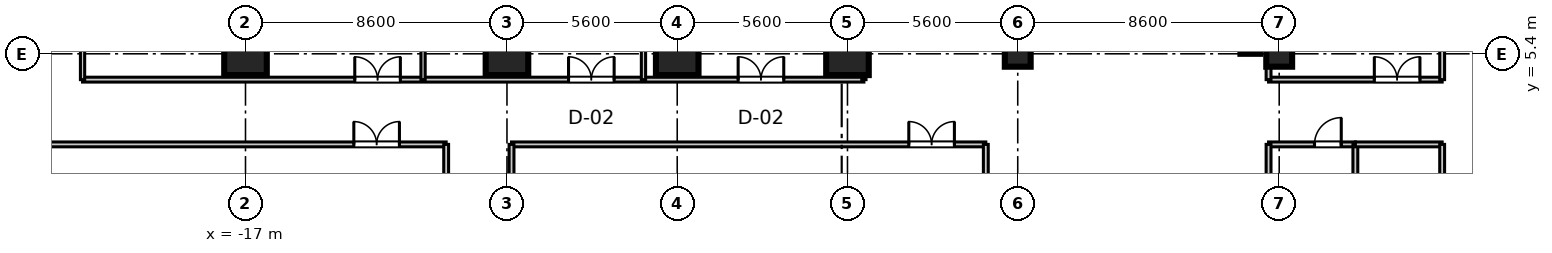
"""IFC4 building model, lengths in metres.
Left out: names, types, materials, properties, quantities, classifications, styles, units other than length and angle.
Written with IfcOpenShell. Run it as: python <this file> out.ifc"""

import sys

from ifc_helpers import new_model, si_unit, direction, frame, frame_2d, origin, origin_2d, place, context, subcontext, project, spatial, rectangle, extrude, source, transform, mapped, element, fill, save


model = new_model("IFC4")
c1 = context("Model", 3, precision=1e-05, world=origin(), true_north=direction((0.0, 1.0)))
c2 = subcontext(c1, "Body", "Model", "MODEL_VIEW")
j1 = project(units=[si_unit("LENGTHUNIT", "METRE"), si_unit("PLANEANGLEUNIT", "RADIAN")], contexts=[c1])
p1 = place(None, origin())
s1 = spatial("IfcSite", under=j1, at=p1, CompositionType="ELEMENT")
p2 = place(p1, origin())
s2 = spatial("IfcBuilding", under=s1, at=p2, CompositionType="ELEMENT")
p3 = place(p2, frame((0.0, 0.0, 76.2)))
s3 = spatial("IfcBuildingStorey", under=s2, at=p3, CompositionType="ELEMENT", Elevation=76.2)
m1 = source(origin(), c2, "Body", "SweptSolid", [
    extrude(rectangle(XDim=1.4, YDim=1.4, at=origin_2d()), origin(), (0.0, 0.0, 1.0), 3.605),
])
for number, where, z_axis, x_axis in (
    (1, (-17.0, 5.4, 0.0), (0.0, 0.0, 1.0), (1.0, 0.0, 0.0)),
    (2, (-8.4, 5.4, 0.0), (0.0, 0.0, 1.0), (1.0, 0.0, 0.0)),
    (3, (-2.8, 5.4, 0.0), (0.0, 0.0, 1.0), (1.0, 0.0, 0.0)),
    (4, (2.8, 5.4, 0.0), (0.0, 0.0, 1.0), (1.0, 0.0, 0.0)),
):
    element("IfcColumn", number, at=place(p3, frame(where, z_axis=z_axis, x_axis=x_axis)), inside=s3, PredefinedType="COLUMN", context=c2, shape_type="MappedRepresentation", body=[
        mapped(m1, transform((0.0, 0.0, 0.0), scale=1.0)),
    ])
m2 = source(origin(), c2, "Body", "SweptSolid", [
    extrude(rectangle(XDim=0.85, YDim=0.85, at=origin_2d()), origin(), (0.0, 0.0, 1.0), 3.605),
])
for number, where, z_axis, x_axis in (
    (5, (8.4, 5.4, 0.0), (0.0, 0.0, 1.0), (1.0, 0.0, 0.0)),
    (6, (17.0, 5.4, 0.0), (0.0, 0.0, 1.0), (1.0, 0.0, 0.0)),
):
    element("IfcColumn", number, at=place(p3, frame(where, z_axis=z_axis, x_axis=x_axis)), inside=s3, PredefinedType="PILASTER", context=c2, shape_type="MappedRepresentation", body=[
        mapped(m2, transform((0.0, 0.0, 0.0), scale=1.0)),
    ])
m3 = source(origin(), c2, "Body", "SweptSolid", [
    extrude(rectangle(XDim=11.6, YDim=0.65, at=frame_2d((5.8, 0.0))), origin(), (0.0, 0.0, 1.0), 3.37),
])
p4 = place(p3, frame((16.05, 5.4, 0.0), z_axis=(0.0, 0.0, 1.0), x_axis=(0.0, 1.0, 0.0)))
e7 = element("IfcWall", 7, at=p4, inside=s3, PredefinedType="SHEAR", context=c2, shape_type="MappedRepresentation", body=[
    mapped(m3, transform((0.0, 0.0, 0.0), scale=1.0)),
])
m4 = source(origin(), c2, "Body", "SweptSolid", [
    extrude(rectangle(XDim=5.71, YDim=0.16, at=frame_2d((2.855, 0.0))), origin(), (0.0, 0.0, 1.0), 2.71),
])
p5 = place(p3, frame((16.65, 4.55, 0.0), z_axis=(0.0, 0.0, 1.0), x_axis=(1.0, 0.0, 0.0)))
e8 = element("IfcWall", 8, at=p5, inside=s3, PredefinedType="PARTITIONING", context=c2, shape_type="MappedRepresentation", body=[
    mapped(m4, transform((0.0, 0.0, 0.0), scale=1.0)),
])
p6 = place(p5, frame((3.479, 0.0, 0.0)))
e9 = element("IfcOpeningElement", 9, at=p6, cuts=e8, PredefinedType="OPENING", context=c2, shape_type="SweptSolid", body=[
    extrude(rectangle(XDim=1.5, YDim=2.15, at=frame_2d((0.75, 1.075))), frame((0.0, 0.09, 0.0), z_axis=(0.0, -1.0, 0.0), x_axis=(1.0, 0.0, 0.0)), (0.0, 0.0, 1.0), 0.18),
])
m5 = source(origin(), c2, "Body", "SweptSolid", [
    extrude(rectangle(XDim=20.55, YDim=0.16, at=frame_2d((10.275, 0.0))), origin(), (0.0, 0.0, 1.0), 2.71),
])
p7 = place(p3, frame((16.65, 4.55, 0.0), z_axis=(0.0, 0.0, 1.0), x_axis=(0.0, 1.0, 0.0)))
e10 = element("IfcWall", 10, at=p7, inside=s3, PredefinedType="PARTITIONING", context=c2, shape_type="MappedRepresentation", body=[
    mapped(m5, transform((0.0, 0.0, 0.0), scale=1.0)),
])
m6 = source(origin(), c2, "Body", "SweptSolid", [
    extrude(rectangle(XDim=19.13, YDim=0.16, at=frame_2d((9.565, 0.0))), origin(), (0.0, 0.0, 1.0), 2.71),
])
p8 = place(p3, frame((22.36, 4.55, 0.0), z_axis=(0.0, 0.0, 1.0), x_axis=(0.0, 1.0, 0.0)))
e11 = element("IfcWall", 11, at=p8, inside=s3, PredefinedType="PARTITIONING", context=c2, shape_type="MappedRepresentation", body=[
    mapped(m6, transform((0.0, 0.0, 0.0), scale=1.0)),
])
m7 = source(origin(), c2, "Body", "SweptSolid", [
    extrude(rectangle(XDim=25.7, YDim=0.16, at=frame_2d((12.85, 0.0))), origin(), (0.0, 0.0, 1.0), 2.71),
])
p9 = place(p3, frame((-22.36, 4.55, 0.0), z_axis=(0.0, 0.0, 1.0), x_axis=(1.0, 0.0, 0.0)))
e12 = element("IfcWall", 12, at=p9, inside=s3, PredefinedType="PARTITIONING", context=c2, shape_type="MappedRepresentation", body=[
    mapped(m7, transform((0.0, 0.0, 0.0), scale=1.0)),
])
p10 = place(p9, frame((8.954, 0.0, 0.0)))
e13 = element("IfcOpeningElement", 13, at=p10, cuts=e12, PredefinedType="OPENING", context=c2, shape_type="SweptSolid", body=[
    extrude(rectangle(XDim=1.5, YDim=2.15, at=frame_2d((0.75, 1.075))), frame((0.0, 0.09, 0.0), z_axis=(0.0, -1.0, 0.0), x_axis=(1.0, 0.0, 0.0)), (0.0, 0.0, 1.0), 0.18),
])
p11 = place(p9, frame((15.985, 0.0, 0.0)))
e14 = element("IfcOpeningElement", 14, at=p11, cuts=e12, PredefinedType="OPENING", context=c2, shape_type="SweptSolid", body=[
    extrude(rectangle(XDim=1.5, YDim=2.15, at=frame_2d((0.75, 1.075))), frame((0.0, 0.09, 0.0), z_axis=(0.0, -1.0, 0.0), x_axis=(1.0, 0.0, 0.0)), (0.0, 0.0, 1.0), 0.18),
])
p12 = place(p9, frame((21.564, 0.0, 0.0)))
e15 = element("IfcOpeningElement", 15, at=p12, cuts=e12, PredefinedType="OPENING", context=c2, shape_type="SweptSolid", body=[
    extrude(rectangle(XDim=1.5, YDim=2.15, at=frame_2d((0.75, 1.075))), frame((0.0, 0.09, 0.0), z_axis=(0.0, -1.0, 0.0), x_axis=(1.0, 0.0, 0.0)), (0.0, 0.0, 1.0), 0.18),
])
m8 = source(origin(), c2, "Body", "SweptSolid", [
    extrude(rectangle(XDim=19.13, YDim=0.14, at=frame_2d((9.565, 0.0))), origin(), (0.0, 0.0, 1.0), 2.71),
])
p13 = place(p3, frame((-22.36, 4.55, 0.0), z_axis=(0.0, 0.0, 1.0), x_axis=(0.0, 1.0, 0.0)))
e16 = element("IfcWall", 16, at=p13, inside=s3, PredefinedType="PARTITIONING", context=c2, shape_type="MappedRepresentation", body=[
    mapped(m8, transform((0.0, 0.0, 0.0), scale=1.0)),
])
m9 = source(origin(), c2, "Body", "SweptSolid", [
    extrude(rectangle(XDim=20.55, YDim=0.14, at=frame_2d((10.275, 0.0))), origin(), (0.0, 0.0, 1.0), 2.71),
])
for number, where, z_axis, x_axis in (
    (17, (3.34, 4.55, 0.0), (0.0, 0.0, 1.0), (0.0, 1.0, 0.0)),
    (18, (-11.16, 4.55, 0.0), (0.0, 0.0, 1.0), (0.0, 1.0, 0.0)),
    (19, (-3.91, 4.55, 0.0), (0.0, 0.0, 1.0), (0.0, 1.0, 0.0)),
):
    element("IfcWall", number, at=place(p3, frame(where, z_axis=z_axis, x_axis=x_axis)), inside=s3, PredefinedType="PARTITIONING", context=c2, shape_type="MappedRepresentation", body=[
        mapped(m9, transform((0.0, 0.0, 0.0), scale=1.0)),
    ])
m10 = source(origin(), c2, "Body", "SweptSolid", [
    extrude(rectangle(XDim=14.7, YDim=0.16, at=frame_2d((7.35, 0.0))), origin(), (0.0, 0.0, 1.0), 2.71),
])
p14 = place(p3, frame((-25.1, 2.42, 0.0), z_axis=(0.0, 0.0, 1.0), x_axis=(1.0, 0.0, 0.0)))
e20 = element("IfcWall", 20, at=p14, inside=s3, PredefinedType="PARTITIONING", context=c2, shape_type="MappedRepresentation", body=[
    mapped(m10, transform((0.0, 0.0, 0.0), scale=1.0)),
])
p15 = place(p14, frame((11.663, 0.0, 0.0)))
e21 = element("IfcOpeningElement", 21, at=p15, cuts=e20, PredefinedType="OPENING", context=c2, shape_type="SweptSolid", body=[
    extrude(rectangle(XDim=1.5, YDim=2.15, at=frame_2d((0.75, 1.075))), frame((0.0, 0.09, 0.0), z_axis=(0.0, -1.0, 0.0), x_axis=(1.0, 0.0, 0.0)), (0.0, 0.0, 1.0), 0.18),
])
m11 = source(origin(), c2, "Body", "SweptSolid", [
    extrude(rectangle(XDim=4.84, YDim=0.16, at=frame_2d((2.42, 0.0))), origin(), (0.0, 0.0, 1.0), 2.71),
])
p16 = place(p3, frame((-10.4, -2.42, 0.0), z_axis=(0.0, 0.0, 1.0), x_axis=(0.0, 1.0, 0.0)))
e22 = element("IfcWall", 22, at=p16, inside=s3, PredefinedType="PARTITIONING", context=c2, shape_type="MappedRepresentation", body=[
    mapped(m11, transform((0.0, 0.0, 0.0), scale=1.0)),
])
m12 = source(origin(), c2, "Body", "SweptSolid", [
    extrude(rectangle(XDim=15.6, YDim=0.16, at=frame_2d((7.8, 0.0))), origin(), (0.0, 0.0, 1.0), 2.71),
])
p17 = place(p3, frame((-8.25, 2.42, 0.0), z_axis=(0.0, 0.0, 1.0), x_axis=(1.0, 0.0, 0.0)))
e23 = element("IfcWall", 23, at=p17, inside=s3, PredefinedType="PARTITIONING", context=c2, shape_type="MappedRepresentation", body=[
    mapped(m12, transform((0.0, 0.0, 0.0), scale=1.0)),
])
p18 = place(p17, frame((13.067, 0.0, 0.0)))
e24 = element("IfcOpeningElement", 24, at=p18, cuts=e23, PredefinedType="OPENING", context=c2, shape_type="SweptSolid", body=[
    extrude(rectangle(XDim=1.5, YDim=2.15, at=frame_2d((0.75, 1.075))), frame((0.0, 0.09, 0.0), z_axis=(0.0, -1.0, 0.0), x_axis=(1.0, 0.0, 0.0)), (0.0, 0.0, 1.0), 0.18),
])
for number, where, z_axis, x_axis in (
    (25, (-8.25, -2.42, 0.0), (0.0, 0.0, 1.0), (0.0, 1.0, 0.0)),
    (26, (7.35, -2.42, 0.0), (0.0, 0.0, 1.0), (0.0, 1.0, 0.0)),
):
    element("IfcWall", number, at=place(p3, frame(where, z_axis=z_axis, x_axis=x_axis)), inside=s3, PredefinedType="PARTITIONING", context=c2, shape_type="MappedRepresentation", body=[
        mapped(m11, transform((0.0, 0.0, 0.0), scale=1.0)),
    ])
m13 = source(origin(), c2, "Body", "SweptSolid", [
    extrude(rectangle(XDim=2.855, YDim=0.16, at=frame_2d((1.427, 0.0))), origin(), (0.0, 0.0, 1.0), 2.71),
])
p19 = place(p3, frame((16.65, 2.42, 0.0), z_axis=(0.0, 0.0, 1.0), x_axis=(1.0, 0.0, 0.0)))
e27 = element("IfcWall", 27, at=p19, inside=s3, PredefinedType="PARTITIONING", context=c2, shape_type="MappedRepresentation", body=[
    mapped(m13, transform((0.0, 0.0, 0.0), scale=1.0)),
])
p20 = place(p19, frame((1.511, 0.0, 0.0)))
e28 = element("IfcOpeningElement", 28, at=p20, cuts=e27, PredefinedType="OPENING", context=c2, shape_type="SweptSolid", body=[
    extrude(rectangle(XDim=0.88, YDim=2.1, at=frame_2d((0.44, 1.05))), frame((0.0, 0.09, 0.0), z_axis=(0.0, -1.0, 0.0), x_axis=(1.0, 0.0, 0.0)), (0.0, 0.0, 1.0), 0.18),
])
for number, where, z_axis, x_axis in (
    (29, (16.65, -2.42, 0.0), (0.0, 0.0, 1.0), (0.0, 1.0, 0.0)),
    (30, (19.505, -2.42, 0.0), (0.0, 0.0, 1.0), (0.0, 1.0, 0.0)),
):
    element("IfcWall", number, at=place(p3, frame(where, z_axis=z_axis, x_axis=x_axis)), inside=s3, PredefinedType="PARTITIONING", context=c2, shape_type="MappedRepresentation", body=[
        mapped(m11, transform((0.0, 0.0, 0.0), scale=1.0)),
    ])
m14 = source(origin(), c2, "Body", "SweptSolid", [
    extrude(rectangle(XDim=2.855, YDim=0.16, at=frame_2d((1.428, 0.0))), origin(), (0.0, 0.0, 1.0), 2.71),
])
p21 = place(p3, frame((19.505, 2.42, 0.0), z_axis=(0.0, 0.0, 1.0), x_axis=(1.0, 0.0, 0.0)))
e31 = element("IfcWall", 31, at=p21, inside=s3, PredefinedType="PARTITIONING", context=c2, shape_type="MappedRepresentation", body=[
    mapped(m14, transform((0.0, 0.0, 0.0), scale=1.0)),
])
p22 = place(p3, frame((22.36, -2.42, 0.0), z_axis=(0.0, 0.0, 1.0), x_axis=(0.0, 1.0, 0.0)))
e32 = element("IfcWall", 32, at=p22, inside=s3, PredefinedType="PARTITIONING", context=c2, shape_type="MappedRepresentation", body=[
    mapped(m11, transform((0.0, 0.0, 0.0), scale=1.0)),
])
m15 = source(origin(), c2, "Body", "SweptSolid", [
    extrude(rectangle(XDim=1.5, YDim=2.15, at=frame_2d((0.75, 1.075))), frame((0.0, 0.025, 0.0), z_axis=(0.0, -1.0, 0.0), x_axis=(1.0, 0.0, 0.0)), (0.0, 0.0, 1.0), 0.05),
])
p23 = place(p6, origin())
e33 = element("IfcDoor", 33, at=p23, inside=s3, OperationType="DOUBLE_DOOR_SINGLE_SWING", PredefinedType="DOOR", context=c2, shape_type="MappedRepresentation", body=[
    mapped(m15, transform((0.0, 0.0, 0.0), scale=1.0)),
])
fill(e9, e33)
p24 = place(p10, origin())
e34 = element("IfcDoor", 34, at=p24, inside=s3, OperationType="DOUBLE_DOOR_SINGLE_SWING", PredefinedType="DOOR", context=c2, shape_type="MappedRepresentation", body=[
    mapped(m15, transform((0.0, 0.0, 0.0), scale=1.0)),
])
fill(e13, e34)
p25 = place(p11, origin())
e35 = element("IfcDoor", 35, at=p25, inside=s3, OperationType="DOUBLE_DOOR_SINGLE_SWING", PredefinedType="DOOR", context=c2, shape_type="MappedRepresentation", body=[
    mapped(m15, transform((0.0, 0.0, 0.0), scale=1.0)),
])
fill(e14, e35)
p26 = place(p12, origin())
e36 = element("IfcDoor", 36, at=p26, inside=s3, OperationType="DOUBLE_DOOR_SINGLE_SWING", PredefinedType="DOOR", context=c2, shape_type="MappedRepresentation", body=[
    mapped(m15, transform((0.0, 0.0, 0.0), scale=1.0)),
])
fill(e15, e36)
p27 = place(p15, origin())
e37 = element("IfcDoor", 37, at=p27, inside=s3, OperationType="DOUBLE_DOOR_SINGLE_SWING", PredefinedType="DOOR", context=c2, shape_type="MappedRepresentation", body=[
    mapped(m15, transform((0.0, 0.0, 0.0), scale=1.0)),
])
fill(e21, e37)
p28 = place(p18, frame((1.5, 0.0, 0.0), z_axis=(0.0, 0.0, 1.0), x_axis=(-1.0, 0.0, 0.0)))
e38 = element("IfcDoor", 38, at=p28, inside=s3, OperationType="DOUBLE_DOOR_SINGLE_SWING", PredefinedType="DOOR", context=c2, shape_type="MappedRepresentation", body=[
    mapped(m15, transform((0.0, 0.0, 0.0), scale=1.0)),
])
fill(e24, e38)
m16 = source(origin(), c2, "Body", "SweptSolid", [
    extrude(rectangle(XDim=0.88, YDim=2.1, at=frame_2d((0.44, 1.05))), frame((0.0, 0.025, 0.0), z_axis=(0.0, -1.0, 0.0), x_axis=(1.0, 0.0, 0.0)), (0.0, 0.0, 1.0), 0.05),
])
p29 = place(p20, frame((0.88, 0.0, 0.0), z_axis=(0.0, 0.0, 1.0), x_axis=(-1.0, 0.0, 0.0)))
e39 = element("IfcDoor", 39, at=p29, inside=s3, OperationType="SINGLE_SWING_RIGHT", PredefinedType="DOOR", context=c2, shape_type="MappedRepresentation", body=[
    mapped(m16, transform((0.0, 0.0, 0.0), scale=1.0)),
])
fill(e28, e39)
save(model, sys.argv[1])
